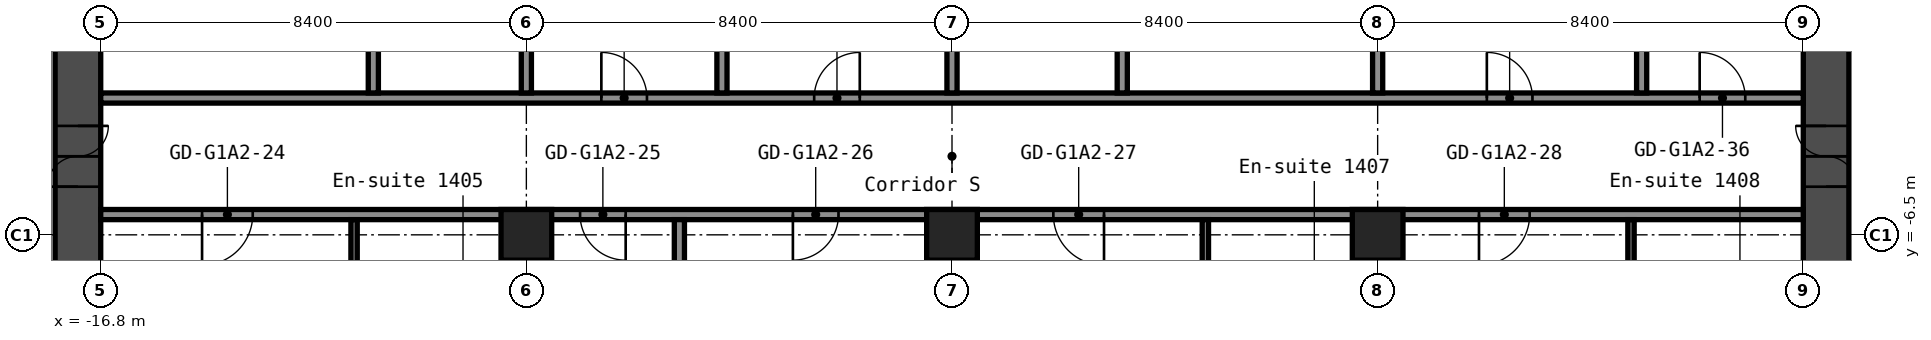
"""IFC4 building model, lengths in metres.
Left out: names, types, materials, properties, quantities, classifications, styles, units other than length and angle.
Written with IfcOpenShell. Run it as: python <this file> out.ifc"""

import sys

from ifc_helpers import new_model, si_unit, direction, frame, frame_2d, origin, origin_2d, place, context, subcontext, project, spatial, rectangle, hollow_rectangle, extrude, element, fill, save


model = new_model("IFC4")
c1 = context("Model", 3, precision=1e-05, world=origin(), true_north=direction((0.0, 1.0)))
c2 = subcontext(c1, "Body", "Model", "MODEL_VIEW")
j1 = project(units=[si_unit("LENGTHUNIT", "METRE"), si_unit("PLANEANGLEUNIT", "RADIAN")], contexts=[c1])
p1 = place(None, origin())
s1 = spatial("IfcSite", under=j1, at=p1, CompositionType="ELEMENT")
p2 = place(p1, origin())
s2 = spatial("IfcBuilding", under=s1, at=p2, CompositionType="ELEMENT")
p3 = place(p2, frame((0.0, 0.0, 51.8)))
s3 = spatial("IfcBuildingStorey", under=s2, at=p3, CompositionType="ELEMENT", Elevation=51.8)
for number, where, z_axis, x_axis in (
    (1, (-8.4, -6.5, 0.0), (0.0, 0.0, 1.0), (1.0, 0.0, 0.0)),
    (2, (0.0, -6.5, 0.0), (0.0, 0.0, 1.0), (1.0, 0.0, 0.0)),
    (3, (8.4, -6.5, 0.0), (0.0, 0.0, 1.0), (1.0, 0.0, 0.0)),
):
    element("IfcColumn", number, at=place(p3, frame(where, z_axis=z_axis, x_axis=x_axis)), inside=s3, PredefinedType="COLUMN", context=c2, shape_type="SweptSolid", body=[
        extrude(hollow_rectangle(XDim=1.0, YDim=1.0, WallThickness=0.04, at=origin_2d()), origin(), (0.0, 0.0, 1.0), 2.8),
    ])
p4 = place(p3, frame((-17.25, -8.4, 0.0), z_axis=(0.0, 0.0, 1.0), x_axis=(0.0, 1.0, 0.0)))
e4 = element("IfcWall", 4, at=p4, inside=s3, PredefinedType="SHEAR", context=c2, shape_type="SweptSolid", body=[
    extrude(rectangle(XDim=16.8, YDim=0.9, at=frame_2d((8.4, 0.0))), origin(), (0.0, 0.0, 1.0), 2.8),
])
p5 = place(p4, frame((12.75, 0.0, 0.0)))
e5 = element("IfcOpeningElement", 5, at=p5, cuts=e4, PredefinedType="OPENING", context=c2, shape_type="SweptSolid", body=[
    extrude(rectangle(XDim=1.2, YDim=2.1, at=frame_2d((0.6, 1.05))), frame((0.0, 0.46, 0.0), z_axis=(0.0, -1.0, 0.0), x_axis=(1.0, 0.0, 0.0)), (0.0, 0.0, 1.0), 0.92),
])
p6 = place(p4, frame((2.85, 0.0, 0.0)))
e6 = element("IfcOpeningElement", 6, at=p6, cuts=e4, PredefinedType="OPENING", context=c2, shape_type="SweptSolid", body=[
    extrude(rectangle(XDim=1.2, YDim=2.1, at=frame_2d((0.6, 1.05))), frame((0.0, 0.46, 0.0), z_axis=(0.0, -1.0, 0.0), x_axis=(1.0, 0.0, 0.0)), (0.0, 0.0, 1.0), 0.92),
])
p7 = place(p3, frame((17.25, -8.4, 0.0), z_axis=(0.0, 0.0, 1.0), x_axis=(0.0, 1.0, 0.0)))
e7 = element("IfcWall", 7, at=p7, inside=s3, PredefinedType="SHEAR", context=c2, shape_type="SweptSolid", body=[
    extrude(rectangle(XDim=16.8, YDim=0.9, at=frame_2d((8.4, 0.0))), origin(), (0.0, 0.0, 1.0), 2.8),
])
p8 = place(p7, frame((12.75, 0.0, 0.0)))
e8 = element("IfcOpeningElement", 8, at=p8, cuts=e7, PredefinedType="OPENING", context=c2, shape_type="SweptSolid", body=[
    extrude(rectangle(XDim=1.2, YDim=2.1, at=frame_2d((0.6, 1.05))), frame((0.0, 0.46, 0.0), z_axis=(0.0, -1.0, 0.0), x_axis=(1.0, 0.0, 0.0)), (0.0, 0.0, 1.0), 0.92),
])
p9 = place(p7, frame((2.85, 0.0, 0.0)))
e9 = element("IfcOpeningElement", 9, at=p9, cuts=e7, PredefinedType="OPENING", context=c2, shape_type="SweptSolid", body=[
    extrude(rectangle(XDim=1.2, YDim=2.1, at=frame_2d((0.6, 1.05))), frame((0.0, 0.46, 0.0), z_axis=(0.0, -1.0, 0.0), x_axis=(1.0, 0.0, 0.0)), (0.0, 0.0, 1.0), 0.92),
])
p10 = place(p3, frame((-16.8, -6.1, 0.0), z_axis=(0.0, 0.0, 1.0), x_axis=(1.0, 0.0, 0.0)))
e10 = element("IfcWall", 10, at=p10, inside=s3, PredefinedType="PARTITIONING", context=c2, shape_type="SweptSolid", body=[
    extrude(rectangle(XDim=33.6, YDim=0.2, at=frame_2d((16.8, 0.0))), origin(), (0.0, 0.0, 1.0), 2.8),
])
p11 = place(p10, frame((2.0, 0.0, 0.0)))
e11 = element("IfcOpeningElement", 11, at=p11, cuts=e10, PredefinedType="OPENING", context=c2, shape_type="SweptSolid", body=[
    extrude(rectangle(XDim=1.0, YDim=2.1, at=frame_2d((0.5, 1.05))), frame((0.0, 0.11, 0.0), z_axis=(0.0, -1.0, 0.0), x_axis=(1.0, 0.0, 0.0)), (0.0, 0.0, 1.0), 0.22),
])
p12 = place(p10, frame((9.46, 0.0, 0.0)))
e12 = element("IfcOpeningElement", 12, at=p12, cuts=e10, PredefinedType="OPENING", context=c2, shape_type="SweptSolid", body=[
    extrude(rectangle(XDim=0.9, YDim=2.1, at=frame_2d((0.45, 1.05))), frame((0.0, 0.11, 0.0), z_axis=(0.0, -1.0, 0.0), x_axis=(1.0, 0.0, 0.0)), (0.0, 0.0, 1.0), 0.22),
])
p13 = place(p10, frame((13.66, 0.0, 0.0)))
e13 = element("IfcOpeningElement", 13, at=p13, cuts=e10, PredefinedType="OPENING", context=c2, shape_type="SweptSolid", body=[
    extrude(rectangle(XDim=0.9, YDim=2.1, at=frame_2d((0.45, 1.05))), frame((0.0, 0.11, 0.0), z_axis=(0.0, -1.0, 0.0), x_axis=(1.0, 0.0, 0.0)), (0.0, 0.0, 1.0), 0.22),
])
p14 = place(p10, frame((18.8, 0.0, 0.0)))
e14 = element("IfcOpeningElement", 14, at=p14, cuts=e10, PredefinedType="OPENING", context=c2, shape_type="SweptSolid", body=[
    extrude(rectangle(XDim=1.0, YDim=2.1, at=frame_2d((0.5, 1.05))), frame((0.0, 0.11, 0.0), z_axis=(0.0, -1.0, 0.0), x_axis=(1.0, 0.0, 0.0)), (0.0, 0.0, 1.0), 0.22),
])
p15 = place(p10, frame((27.2, 0.0, 0.0)))
e15 = element("IfcOpeningElement", 15, at=p15, cuts=e10, PredefinedType="OPENING", context=c2, shape_type="SweptSolid", body=[
    extrude(rectangle(XDim=1.0, YDim=2.1, at=frame_2d((0.5, 1.05))), frame((0.0, 0.11, 0.0), z_axis=(0.0, -1.0, 0.0), x_axis=(1.0, 0.0, 0.0)), (0.0, 0.0, 1.0), 0.22),
])
p16 = place(p3, frame((-16.8, -3.8, 0.0), z_axis=(0.0, 0.0, 1.0), x_axis=(1.0, 0.0, 0.0)))
e16 = element("IfcWall", 16, at=p16, inside=s3, PredefinedType="PARTITIONING", context=c2, shape_type="SweptSolid", body=[
    extrude(rectangle(XDim=33.6, YDim=0.2, at=frame_2d((16.8, 0.0))), origin(), (0.0, 0.0, 1.0), 2.8),
])
p17 = place(p16, frame((9.88, 0.0, 0.0)))
e17 = element("IfcOpeningElement", 17, at=p17, cuts=e16, PredefinedType="OPENING", context=c2, shape_type="SweptSolid", body=[
    extrude(rectangle(XDim=0.9, YDim=2.1, at=frame_2d((0.45, 1.05))), frame((0.0, 0.11, 0.0), z_axis=(0.0, -1.0, 0.0), x_axis=(1.0, 0.0, 0.0)), (0.0, 0.0, 1.0), 0.22),
])
p18 = place(p16, frame((14.08, 0.0, 0.0)))
e18 = element("IfcOpeningElement", 18, at=p18, cuts=e16, PredefinedType="OPENING", context=c2, shape_type="SweptSolid", body=[
    extrude(rectangle(XDim=0.9, YDim=2.1, at=frame_2d((0.45, 1.05))), frame((0.0, 0.11, 0.0), z_axis=(0.0, -1.0, 0.0), x_axis=(1.0, 0.0, 0.0)), (0.0, 0.0, 1.0), 0.22),
])
p19 = place(p16, frame((27.355, 0.0, 0.0)))
e19 = element("IfcOpeningElement", 19, at=p19, cuts=e16, PredefinedType="OPENING", context=c2, shape_type="SweptSolid", body=[
    extrude(rectangle(XDim=0.9, YDim=2.1, at=frame_2d((0.45, 1.05))), frame((0.0, 0.11, 0.0), z_axis=(0.0, -1.0, 0.0), x_axis=(1.0, 0.0, 0.0)), (0.0, 0.0, 1.0), 0.22),
])
p20 = place(p16, frame((31.555, 0.0, 0.0)))
e20 = element("IfcOpeningElement", 20, at=p20, cuts=e16, PredefinedType="OPENING", context=c2, shape_type="SweptSolid", body=[
    extrude(rectangle(XDim=0.9, YDim=2.1, at=frame_2d((0.45, 1.05))), frame((0.0, 0.11, 0.0), z_axis=(0.0, -1.0, 0.0), x_axis=(1.0, 0.0, 0.0)), (0.0, 0.0, 1.0), 0.22),
])
p21 = place(p3, frame((-11.8, -9.5, 0.0), z_axis=(0.0, 0.0, 1.0), x_axis=(0.0, 1.0, 0.0)))
e21 = element("IfcWall", 21, at=p21, inside=s3, PredefinedType="PARTITIONING", context=c2, shape_type="SweptSolid", body=[
    extrude(rectangle(XDim=3.3, YDim=0.125, at=frame_2d((1.65, 0.0))), origin(), (0.0, 0.0, 1.0), 2.8),
])
p22 = place(p3, frame((-11.42, -3.7, 0.0), z_axis=(0.0, 0.0, 1.0), x_axis=(0.0, 1.0, 0.0)))
e22 = element("IfcWall", 22, at=p22, inside=s3, PredefinedType="PARTITIONING", context=c2, shape_type="SweptSolid", body=[
    extrude(rectangle(XDim=7.4, YDim=0.2, at=frame_2d((3.7, 0.0))), origin(), (0.0, 0.0, 1.0), 2.8),
])
p23 = place(p3, frame((-8.4, -20.3, 0.0), z_axis=(0.0, 0.0, 1.0), x_axis=(0.0, 1.0, 0.0)))
e23 = element("IfcWall", 23, at=p23, inside=s3, PredefinedType="PARTITIONING", context=c2, shape_type="SweptSolid", body=[
    extrude(rectangle(XDim=13.31, YDim=0.2, at=frame_2d((6.655, 0.0))), origin(), (0.0, 0.0, 1.0), 2.8),
])
p24 = place(p3, frame((-8.4, -3.7, 0.0), z_axis=(0.0, 0.0, 1.0), x_axis=(0.0, 1.0, 0.0)))
e24 = element("IfcWall", 24, at=p24, inside=s3, PredefinedType="PARTITIONING", context=c2, shape_type="SweptSolid", body=[
    extrude(rectangle(XDim=7.4, YDim=0.2, at=frame_2d((3.7, 0.0))), origin(), (0.0, 0.0, 1.0), 2.8),
])
p25 = place(p3, frame((-5.38, -20.3, 0.0), z_axis=(0.0, 0.0, 1.0), x_axis=(0.0, 1.0, 0.0)))
e25 = element("IfcWall", 25, at=p25, inside=s3, PredefinedType="PARTITIONING", context=c2, shape_type="SweptSolid", body=[
    extrude(rectangle(XDim=14.1, YDim=0.2, at=frame_2d((7.05, 0.0))), origin(), (0.0, 0.0, 1.0), 2.8),
])
p26 = place(p3, frame((-4.54, -3.7, 0.0), z_axis=(0.0, 0.0, 1.0), x_axis=(0.0, 1.0, 0.0)))
e26 = element("IfcWall", 26, at=p26, inside=s3, PredefinedType="PARTITIONING", context=c2, shape_type="SweptSolid", body=[
    extrude(rectangle(XDim=7.4, YDim=0.2, at=frame_2d((3.7, 0.0))), origin(), (0.0, 0.0, 1.0), 2.8),
])
p27 = place(p3, frame((0.0, -20.3, 0.0), z_axis=(0.0, 0.0, 1.0), x_axis=(0.0, 1.0, 0.0)))
e27 = element("IfcWall", 27, at=p27, inside=s3, PredefinedType="PARTITIONING", context=c2, shape_type="SweptSolid", body=[
    extrude(rectangle(XDim=13.31, YDim=0.2, at=frame_2d((6.655, 0.0))), origin(), (0.0, 0.0, 1.0), 2.8),
])
for number, where, z_axis, x_axis in (
    (28, (0.0, -3.7, 0.0), (0.0, 0.0, 1.0), (0.0, 1.0, 0.0)),
    (29, (3.36, -3.7, 0.0), (0.0, 0.0, 1.0), (0.0, 1.0, 0.0)),
):
    element("IfcWall", number, at=place(p3, frame(where, z_axis=z_axis, x_axis=x_axis)), inside=s3, PredefinedType="PARTITIONING", context=c2, shape_type="SweptSolid", body=[
        extrude(rectangle(XDim=7.4, YDim=0.2, at=frame_2d((3.7, 0.0))), origin(), (0.0, 0.0, 1.0), 2.8),
    ])
p28 = place(p3, frame((5.0, -9.5, 0.0), z_axis=(0.0, 0.0, 1.0), x_axis=(0.0, 1.0, 0.0)))
e30 = element("IfcWall", 30, at=p28, inside=s3, PredefinedType="PARTITIONING", context=c2, shape_type="SweptSolid", body=[
    extrude(rectangle(XDim=3.3, YDim=0.125, at=frame_2d((1.65, 0.0))), origin(), (0.0, 0.0, 1.0), 2.8),
])
p29 = place(p3, frame((8.4, -20.3, 0.0), z_axis=(0.0, 0.0, 1.0), x_axis=(0.0, 1.0, 0.0)))
e31 = element("IfcWall", 31, at=p29, inside=s3, PredefinedType="PARTITIONING", context=c2, shape_type="SweptSolid", body=[
    extrude(rectangle(XDim=13.31, YDim=0.2, at=frame_2d((6.655, 0.0))), origin(), (0.0, 0.0, 1.0), 2.8),
])
p30 = place(p3, frame((8.4, -3.7, 0.0), z_axis=(0.0, 0.0, 1.0), x_axis=(0.0, 1.0, 0.0)))
e32 = element("IfcWall", 32, at=p30, inside=s3, PredefinedType="PARTITIONING", context=c2, shape_type="SweptSolid", body=[
    extrude(rectangle(XDim=7.4, YDim=0.2, at=frame_2d((3.7, 0.0))), origin(), (0.0, 0.0, 1.0), 2.8),
])
p31 = place(p3, frame((13.4, -9.5, 0.0), z_axis=(0.0, 0.0, 1.0), x_axis=(0.0, 1.0, 0.0)))
e33 = element("IfcWall", 33, at=p31, inside=s3, PredefinedType="PARTITIONING", context=c2, shape_type="SweptSolid", body=[
    extrude(rectangle(XDim=3.3, YDim=0.125, at=frame_2d((1.65, 0.0))), origin(), (0.0, 0.0, 1.0), 2.8),
])
p32 = place(p3, frame((13.61, -3.7, 0.0), z_axis=(0.0, 0.0, 1.0), x_axis=(0.0, 1.0, 0.0)))
e34 = element("IfcWall", 34, at=p32, inside=s3, PredefinedType="PARTITIONING", context=c2, shape_type="SweptSolid", body=[
    extrude(rectangle(XDim=7.4, YDim=0.2, at=frame_2d((3.7, 0.0))), origin(), (0.0, 0.0, 1.0), 2.8),
])
p33 = place(p6, origin())
e35 = element("IfcDoor", 35, at=p33, inside=s3, OperationType="DOUBLE_DOOR_SINGLE_SWING", PredefinedType="DOOR", context=c2, shape_type="SweptSolid", body=[
    extrude(rectangle(XDim=1.2, YDim=2.1, at=frame_2d((0.6, 1.05))), frame((0.0, 0.025, 0.0), z_axis=(0.0, -1.0, 0.0), x_axis=(1.0, 0.0, 0.0)), (0.0, 0.0, 1.0), 0.05),
])
fill(e6, e35)
p34 = place(p9, origin())
e36 = element("IfcDoor", 36, at=p34, inside=s3, OperationType="DOUBLE_DOOR_SINGLE_SWING", PredefinedType="DOOR", context=c2, shape_type="SweptSolid", body=[
    extrude(rectangle(XDim=1.2, YDim=2.1, at=frame_2d((0.6, 1.05))), frame((0.0, 0.025, 0.0), z_axis=(0.0, -1.0, 0.0), x_axis=(1.0, 0.0, 0.0)), (0.0, 0.0, 1.0), 0.05),
])
fill(e9, e36)
p35 = place(p11, origin())
e37 = element("IfcDoor", 37, at=p35, inside=s3, OperationType="SINGLE_SWING_LEFT", PredefinedType="DOOR", context=c2, shape_type="SweptSolid", body=[
    extrude(rectangle(XDim=1.0, YDim=2.1, at=frame_2d((0.5, 1.05))), frame((0.0, 0.025, 0.0), z_axis=(0.0, -1.0, 0.0), x_axis=(1.0, 0.0, 0.0)), (0.0, 0.0, 1.0), 0.05),
])
fill(e11, e37)
p36 = place(p12, origin())
e38 = element("IfcDoor", 38, at=p36, inside=s3, OperationType="SINGLE_SWING_RIGHT", PredefinedType="DOOR", context=c2, shape_type="SweptSolid", body=[
    extrude(rectangle(XDim=0.9, YDim=2.1, at=frame_2d((0.45, 1.05))), frame((0.0, 0.025, 0.0), z_axis=(0.0, -1.0, 0.0), x_axis=(1.0, 0.0, 0.0)), (0.0, 0.0, 1.0), 0.05),
])
fill(e12, e38)
p37 = place(p13, origin())
e39 = element("IfcDoor", 39, at=p37, inside=s3, OperationType="SINGLE_SWING_LEFT", PredefinedType="DOOR", context=c2, shape_type="SweptSolid", body=[
    extrude(rectangle(XDim=0.9, YDim=2.1, at=frame_2d((0.45, 1.05))), frame((0.0, 0.025, 0.0), z_axis=(0.0, -1.0, 0.0), x_axis=(1.0, 0.0, 0.0)), (0.0, 0.0, 1.0), 0.05),
])
fill(e13, e39)
p38 = place(p14, origin())
e40 = element("IfcDoor", 40, at=p38, inside=s3, OperationType="SINGLE_SWING_RIGHT", PredefinedType="DOOR", context=c2, shape_type="SweptSolid", body=[
    extrude(rectangle(XDim=1.0, YDim=2.1, at=frame_2d((0.5, 1.05))), frame((0.0, 0.025, 0.0), z_axis=(0.0, -1.0, 0.0), x_axis=(1.0, 0.0, 0.0)), (0.0, 0.0, 1.0), 0.05),
])
fill(e14, e40)
p39 = place(p15, origin())
e41 = element("IfcDoor", 41, at=p39, inside=s3, OperationType="SINGLE_SWING_LEFT", PredefinedType="DOOR", context=c2, shape_type="SweptSolid", body=[
    extrude(rectangle(XDim=1.0, YDim=2.1, at=frame_2d((0.5, 1.05))), frame((0.0, 0.025, 0.0), z_axis=(0.0, -1.0, 0.0), x_axis=(1.0, 0.0, 0.0)), (0.0, 0.0, 1.0), 0.05),
])
fill(e15, e41)
p40 = place(p17, origin())
e42 = element("IfcDoor", 42, at=p40, inside=s3, OperationType="SINGLE_SWING_RIGHT", PredefinedType="DOOR", context=c2, shape_type="SweptSolid", body=[
    extrude(rectangle(XDim=0.9, YDim=2.1, at=frame_2d((0.45, 1.05))), frame((0.0, 0.025, 0.0), z_axis=(0.0, -1.0, 0.0), x_axis=(1.0, 0.0, 0.0)), (0.0, 0.0, 1.0), 0.05),
])
fill(e17, e42)
p41 = place(p18, origin())
e43 = element("IfcDoor", 43, at=p41, inside=s3, OperationType="SINGLE_SWING_LEFT", PredefinedType="DOOR", context=c2, shape_type="SweptSolid", body=[
    extrude(rectangle(XDim=0.9, YDim=2.1, at=frame_2d((0.45, 1.05))), frame((0.0, 0.025, 0.0), z_axis=(0.0, -1.0, 0.0), x_axis=(1.0, 0.0, 0.0)), (0.0, 0.0, 1.0), 0.05),
])
fill(e18, e43)
p42 = place(p19, origin())
e44 = element("IfcDoor", 44, at=p42, inside=s3, OperationType="SINGLE_SWING_RIGHT", PredefinedType="DOOR", context=c2, shape_type="SweptSolid", body=[
    extrude(rectangle(XDim=0.9, YDim=2.1, at=frame_2d((0.45, 1.05))), frame((0.0, 0.025, 0.0), z_axis=(0.0, -1.0, 0.0), x_axis=(1.0, 0.0, 0.0)), (0.0, 0.0, 1.0), 0.05),
])
fill(e19, e44)
p43 = place(p20, origin())
e45 = element("IfcDoor", 45, at=p43, inside=s3, OperationType="SINGLE_SWING_RIGHT", PredefinedType="DOOR", context=c2, shape_type="SweptSolid", body=[
    extrude(rectangle(XDim=0.9, YDim=2.1, at=frame_2d((0.45, 1.05))), frame((0.0, 0.025, 0.0), z_axis=(0.0, -1.0, 0.0), x_axis=(1.0, 0.0, 0.0)), (0.0, 0.0, 1.0), 0.05),
])
fill(e20, e45)
save(model, sys.argv[1])
